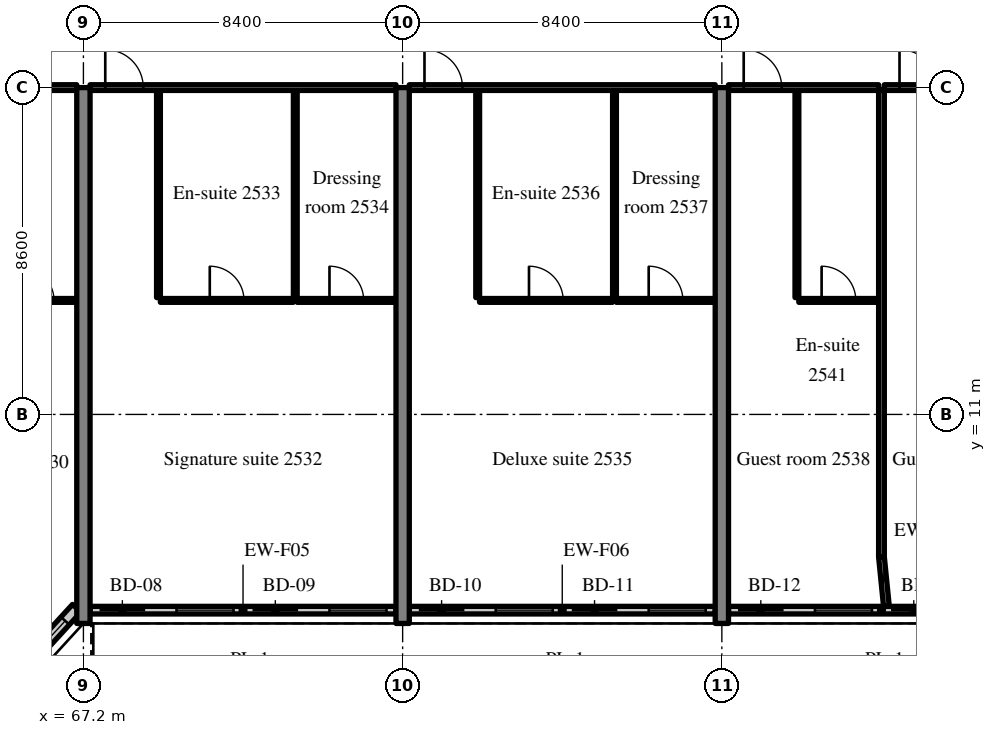
"""IFC4 building model, lengths in metres.
Left out: names, types, materials, properties, quantities, classifications, styles, units other than length and angle.
Written with IfcOpenShell. Run it as: python <this file> out.ifc"""

import sys

from ifc_helpers import new_model, si_unit, direction, frame, frame_2d, origin, place, context, subcontext, project, spatial, rectangle, extrude, source, transform, mapped, element, fill, save


model = new_model("IFC4")
c1 = context("Model", 3, precision=1e-05, world=origin(), true_north=direction((0.0, 1.0)))
c2 = subcontext(c1, "Body", "Model", "MODEL_VIEW")
j1 = project(units=[si_unit("LENGTHUNIT", "METRE"), si_unit("PLANEANGLEUNIT", "RADIAN")], contexts=[c1])
p1 = place(None, origin())
s1 = spatial("IfcSite", under=j1, at=p1, CompositionType="ELEMENT")
p2 = place(p1, origin())
s2 = spatial("IfcBuilding", under=s1, at=p2, CompositionType="ELEMENT")
p3 = place(p2, frame((0.0, 0.0, 106.6)))
s3 = spatial("IfcBuildingStorey", under=s2, at=p3, CompositionType="ELEMENT", Elevation=106.6)
m1 = source(origin(), c2, "Body", "SweptSolid", [
    extrude(rectangle(XDim=14.1, YDim=0.35, at=frame_2d((7.05, 0.0))), origin(), (0.0, 0.0, 1.0), 3.52),
])
for number, where, z_axis, x_axis in (
    (1, (67.2, 5.5, 0.0), (0.0, 0.0, 1.0), (0.0, 1.0, 0.0)),
    (2, (75.6, 5.5, 0.0), (0.0, 0.0, 1.0), (0.0, 1.0, 0.0)),
    (3, (84.0, 5.5, 0.0), (0.0, 0.0, 1.0), (0.0, 1.0, 0.0)),
):
    element("IfcWall", number, at=place(p3, frame(where, z_axis=z_axis, x_axis=x_axis)), inside=s3, PredefinedType="SHEAR", context=c2, shape_type="MappedRepresentation", body=[
        mapped(m1, transform((0.0, 0.0, 0.0), scale=1.0)),
    ])
m2 = source(origin(), c2, "Body", "SweptSolid", [
    extrude(rectangle(XDim=2.398, YDim=0.3, at=frame_2d((1.199, 0.0))), origin(), (0.0, 0.0, 1.0), 3.52),
])
p4 = place(p3, frame((65.404, 4.131, 0.0), z_axis=(0.0, 0.0, 1.0), x_axis=(0.675374189419, 0.737475222815, 0.0)))
e4 = element("IfcWall", 4, at=p4, inside=s3, PredefinedType="SOLIDWALL", context=c2, shape_type="MappedRepresentation", body=[
    mapped(m2, transform((0.0, 0.0, 0.0), scale=1.0)),
])
m3 = source(origin(), c2, "Body", "SweptSolid", [
    extrude(rectangle(XDim=1.5, YDim=2.0, at=frame_2d((0.75, 1.0))), frame((0.0, 0.16, 0.0), z_axis=(0.0, -1.0, 0.0), x_axis=(1.0, 0.0, 0.0)), (0.0, 0.0, 1.0), 0.32),
])
p5 = place(p4, frame((0.449, 0.0, 0.9)))
e5 = element("IfcOpeningElement", 5, at=p5, cuts=e4, PredefinedType="OPENING", context=c2, shape_type="MappedRepresentation", body=[
    mapped(m3, transform((0.0, 0.0, 0.0), scale=1.0)),
])
m4 = source(origin(), c2, "Body", "SweptSolid", [
    extrude(rectangle(XDim=8.05, YDim=0.2, at=frame_2d((4.025, 0.0))), origin(), (0.0, 0.0, 1.0), 2.82),
])
p6 = place(p3, frame((67.375, 5.85, 0.0), z_axis=(0.0, 0.0, 1.0), x_axis=(1.0, 0.0, 0.0)))
e6 = element("IfcWall", 6, at=p6, inside=s3, PredefinedType="SOLIDWALL", context=c2, shape_type="MappedRepresentation", body=[
    mapped(m4, transform((0.0, 0.0, 0.0), scale=1.0)),
])
m5 = source(origin(), c2, "Body", "SweptSolid", [
    extrude(rectangle(XDim=1.2, YDim=2.4, at=frame_2d((0.6, 1.2))), frame((0.0, 0.11, 0.0), z_axis=(0.0, -1.0, 0.0), x_axis=(1.0, 0.0, 0.0)), (0.0, 0.0, 1.0), 0.22),
])
p7 = place(p6, frame((0.25, 0.0, 0.0)))
e7 = element("IfcOpeningElement", 7, at=p7, cuts=e6, PredefinedType="OPENING", context=c2, shape_type="MappedRepresentation", body=[
    mapped(m5, transform((0.0, 0.0, 0.0), scale=1.0)),
])
m6 = source(origin(), c2, "Body", "SweptSolid", [
    extrude(rectangle(XDim=1.5, YDim=1.5, at=frame_2d((0.75, 0.75))), frame((0.0, 0.11, 0.0), z_axis=(0.0, -1.0, 0.0), x_axis=(1.0, 0.0, 0.0)), (0.0, 0.0, 1.0), 0.22),
])
p8 = place(p6, frame((2.275, 0.0, 0.9)))
e8 = element("IfcOpeningElement", 8, at=p8, cuts=e6, PredefinedType="OPENING", context=c2, shape_type="MappedRepresentation", body=[
    mapped(m6, transform((0.0, 0.0, 0.0), scale=1.0)),
])
p9 = place(p6, frame((4.275, 0.0, 0.0)))
e9 = element("IfcOpeningElement", 9, at=p9, cuts=e6, PredefinedType="OPENING", context=c2, shape_type="MappedRepresentation", body=[
    mapped(m5, transform((0.0, 0.0, 0.0), scale=1.0)),
])
p10 = place(p6, frame((6.3, 0.0, 0.9)))
e10 = element("IfcOpeningElement", 10, at=p10, cuts=e6, PredefinedType="OPENING", context=c2, shape_type="MappedRepresentation", body=[
    mapped(m6, transform((0.0, 0.0, 0.0), scale=1.0)),
])
p11 = place(p3, frame((75.775, 5.85, 0.0), z_axis=(0.0, 0.0, 1.0), x_axis=(1.0, 0.0, 0.0)))
e11 = element("IfcWall", 11, at=p11, inside=s3, PredefinedType="SOLIDWALL", context=c2, shape_type="MappedRepresentation", body=[
    mapped(m4, transform((0.0, 0.0, 0.0), scale=1.0)),
])
p12 = place(p11, frame((0.25, 0.0, 0.0)))
e12 = element("IfcOpeningElement", 12, at=p12, cuts=e11, PredefinedType="OPENING", context=c2, shape_type="MappedRepresentation", body=[
    mapped(m5, transform((0.0, 0.0, 0.0), scale=1.0)),
])
p13 = place(p11, frame((2.275, 0.0, 0.9)))
e13 = element("IfcOpeningElement", 13, at=p13, cuts=e11, PredefinedType="OPENING", context=c2, shape_type="MappedRepresentation", body=[
    mapped(m6, transform((0.0, 0.0, 0.0), scale=1.0)),
])
p14 = place(p11, frame((4.275, 0.0, 0.0)))
e14 = element("IfcOpeningElement", 14, at=p14, cuts=e11, PredefinedType="OPENING", context=c2, shape_type="MappedRepresentation", body=[
    mapped(m5, transform((0.0, 0.0, 0.0), scale=1.0)),
])
p15 = place(p11, frame((6.3, 0.0, 0.9)))
e15 = element("IfcOpeningElement", 15, at=p15, cuts=e11, PredefinedType="OPENING", context=c2, shape_type="MappedRepresentation", body=[
    mapped(m6, transform((0.0, 0.0, 0.0), scale=1.0)),
])
p16 = place(p3, frame((84.175, 5.85, 0.0), z_axis=(0.0, 0.0, 1.0), x_axis=(1.0, 0.0, 0.0)))
e16 = element("IfcWall", 16, at=p16, inside=s3, PredefinedType="SOLIDWALL", context=c2, shape_type="MappedRepresentation", body=[
    mapped(m4, transform((0.0, 0.0, 0.0), scale=1.0)),
])
p17 = place(p16, frame((0.25, 0.0, 0.0)))
e17 = element("IfcOpeningElement", 17, at=p17, cuts=e16, PredefinedType="OPENING", context=c2, shape_type="MappedRepresentation", body=[
    mapped(m5, transform((0.0, 0.0, 0.0), scale=1.0)),
])
p18 = place(p16, frame((2.275, 0.0, 0.9)))
e18 = element("IfcOpeningElement", 18, at=p18, cuts=e16, PredefinedType="OPENING", context=c2, shape_type="MappedRepresentation", body=[
    mapped(m6, transform((0.0, 0.0, 0.0), scale=1.0)),
])
p19 = place(p16, frame((4.275, 0.0, 0.0)))
e19 = element("IfcOpeningElement", 19, at=p19, cuts=e16, PredefinedType="OPENING", context=c2, shape_type="MappedRepresentation", body=[
    mapped(m5, transform((0.0, 0.0, 0.0), scale=1.0)),
])
p20 = place(p16, frame((6.3, 0.0, 0.9)))
e20 = element("IfcOpeningElement", 20, at=p20, cuts=e16, PredefinedType="OPENING", context=c2, shape_type="MappedRepresentation", body=[
    mapped(m6, transform((0.0, 0.0, 0.0), scale=1.0)),
])
m7 = source(origin(), c2, "Body", "SweptSolid", [
    extrude(rectangle(XDim=2.1, YDim=0.1, at=frame_2d((1.05, 0.0))), origin(), (0.0, 0.0, 1.0), 3.52),
])
p21 = place(p3, frame((64.925, 14.0, 0.0), z_axis=(0.0, 0.0, 1.0), x_axis=(1.0, 0.0, 0.0)))
e21 = element("IfcWall", 21, at=p21, inside=s3, PredefinedType="PARTITIONING", context=c2, shape_type="MappedRepresentation", body=[
    mapped(m7, transform((0.0, 0.0, 0.0), scale=1.0)),
])
m8 = source(origin(), c2, "Body", "SweptSolid", [
    extrude(rectangle(XDim=0.9, YDim=2.1, at=frame_2d((0.45, 1.05))), frame((0.0, 0.06, 0.0), z_axis=(0.0, -1.0, 0.0), x_axis=(1.0, 0.0, 0.0)), (0.0, 0.0, 1.0), 0.12),
])
p22 = place(p21, frame((0.6, 0.0, 0.0)))
e22 = element("IfcOpeningElement", 22, at=p22, cuts=e21, PredefinedType="OPENING", context=c2, shape_type="MappedRepresentation", body=[
    mapped(m8, transform((0.0, 0.0, 0.0), scale=1.0)),
])
m9 = source(origin(), c2, "Body", "SweptSolid", [
    extrude(rectangle(XDim=3.95, YDim=0.15, at=frame_2d((1.975, 0.0))), origin(), (0.0, 0.0, 1.0), 2.82),
])
p23 = place(p3, frame((63.075, 19.6, 0.0), z_axis=(0.0, 0.0, 1.0), x_axis=(1.0, 0.0, 0.0)))
e23 = element("IfcWall", 23, at=p23, inside=s3, PredefinedType="PARTITIONING", context=c2, shape_type="MappedRepresentation", body=[
    mapped(m9, transform((0.0, 0.0, 0.0), scale=1.0)),
])
m10 = source(origin(), c2, "Body", "SweptSolid", [
    extrude(rectangle(XDim=1.0, YDim=2.1, at=frame_2d((0.5, 1.05))), frame((0.0, 0.085, 0.0), z_axis=(0.0, -1.0, 0.0), x_axis=(1.0, 0.0, 0.0)), (0.0, 0.0, 1.0), 0.17),
])
p24 = place(p23, frame((0.4, 0.0, 0.0)))
e24 = element("IfcOpeningElement", 24, at=p24, cuts=e23, PredefinedType="OPENING", context=c2, shape_type="MappedRepresentation", body=[
    mapped(m10, transform((0.0, 0.0, 0.0), scale=1.0)),
])
m11 = source(origin(), c2, "Body", "SweptSolid", [
    extrude(rectangle(XDim=5.45, YDim=0.1, at=frame_2d((2.725, 0.0))), origin(), (0.0, 0.0, 1.0), 3.52),
])
for number, where, z_axis, x_axis in (
    (25, (69.175, 14.075, 0.0), (0.0, 0.0, 1.0), (0.0, 1.0, 0.0)),
    (26, (72.775, 14.075, 0.0), (0.0, 0.0, 1.0), (0.0, 1.0, 0.0)),
):
    element("IfcWall", number, at=place(p3, frame(where, z_axis=z_axis, x_axis=x_axis)), inside=s3, PredefinedType="PARTITIONING", context=c2, shape_type="MappedRepresentation", body=[
        mapped(m11, transform((0.0, 0.0, 0.0), scale=1.0)),
    ])
m12 = source(origin(), c2, "Body", "SweptSolid", [
    extrude(rectangle(XDim=3.5, YDim=0.1, at=frame_2d((1.75, 0.0))), origin(), (0.0, 0.0, 1.0), 3.52),
])
p25 = place(p3, frame((69.225, 14.0, 0.0), z_axis=(0.0, 0.0, 1.0), x_axis=(1.0, 0.0, 0.0)))
e27 = element("IfcWall", 27, at=p25, inside=s3, PredefinedType="PARTITIONING", context=c2, shape_type="MappedRepresentation", body=[
    mapped(m12, transform((0.0, 0.0, 0.0), scale=1.0)),
])
p26 = place(p25, frame((1.3, 0.0, 0.0)))
e28 = element("IfcOpeningElement", 28, at=p26, cuts=e27, PredefinedType="OPENING", context=c2, shape_type="MappedRepresentation", body=[
    mapped(m8, transform((0.0, 0.0, 0.0), scale=1.0)),
])
m13 = source(origin(), c2, "Body", "SweptSolid", [
    extrude(rectangle(XDim=2.6, YDim=0.1, at=frame_2d((1.3, 0.0))), origin(), (0.0, 0.0, 1.0), 3.52),
])
p27 = place(p3, frame((72.825, 14.0, 0.0), z_axis=(0.0, 0.0, 1.0), x_axis=(1.0, 0.0, 0.0)))
e29 = element("IfcWall", 29, at=p27, inside=s3, PredefinedType="PARTITIONING", context=c2, shape_type="MappedRepresentation", body=[
    mapped(m13, transform((0.0, 0.0, 0.0), scale=1.0)),
])
p28 = place(p27, frame((0.85, 0.0, 0.0)))
e30 = element("IfcOpeningElement", 30, at=p28, cuts=e29, PredefinedType="OPENING", context=c2, shape_type="MappedRepresentation", body=[
    mapped(m8, transform((0.0, 0.0, 0.0), scale=1.0)),
])
m14 = source(origin(), c2, "Body", "SweptSolid", [
    extrude(rectangle(XDim=8.05, YDim=0.15, at=frame_2d((4.025, 0.0))), origin(), (0.0, 0.0, 1.0), 2.82),
])
p29 = place(p3, frame((67.375, 19.6, 0.0), z_axis=(0.0, 0.0, 1.0), x_axis=(1.0, 0.0, 0.0)))
e31 = element("IfcWall", 31, at=p29, inside=s3, PredefinedType="PARTITIONING", context=c2, shape_type="MappedRepresentation", body=[
    mapped(m14, transform((0.0, 0.0, 0.0), scale=1.0)),
])
p30 = place(p29, frame((0.4, 0.0, 0.0)))
e32 = element("IfcOpeningElement", 32, at=p30, cuts=e31, PredefinedType="OPENING", context=c2, shape_type="MappedRepresentation", body=[
    mapped(m10, transform((0.0, 0.0, 0.0), scale=1.0)),
])
for number, where, z_axis, x_axis in (
    (33, (77.575, 14.075, 0.0), (0.0, 0.0, 1.0), (0.0, 1.0, 0.0)),
    (34, (81.175, 14.075, 0.0), (0.0, 0.0, 1.0), (0.0, 1.0, 0.0)),
):
    element("IfcWall", number, at=place(p3, frame(where, z_axis=z_axis, x_axis=x_axis)), inside=s3, PredefinedType="PARTITIONING", context=c2, shape_type="MappedRepresentation", body=[
        mapped(m11, transform((0.0, 0.0, 0.0), scale=1.0)),
    ])
p31 = place(p3, frame((77.625, 14.0, 0.0), z_axis=(0.0, 0.0, 1.0), x_axis=(1.0, 0.0, 0.0)))
e35 = element("IfcWall", 35, at=p31, inside=s3, PredefinedType="PARTITIONING", context=c2, shape_type="MappedRepresentation", body=[
    mapped(m12, transform((0.0, 0.0, 0.0), scale=1.0)),
])
p32 = place(p31, frame((1.3, 0.0, 0.0)))
e36 = element("IfcOpeningElement", 36, at=p32, cuts=e35, PredefinedType="OPENING", context=c2, shape_type="MappedRepresentation", body=[
    mapped(m8, transform((0.0, 0.0, 0.0), scale=1.0)),
])
m15 = source(origin(), c2, "Body", "SweptSolid", [
    extrude(rectangle(XDim=2.6, YDim=0.1, at=frame_2d((1.3, 0.0))), origin(), (0.0, 0.0, 1.0), 3.52),
])
p33 = place(p3, frame((81.225, 14.0, 0.0), z_axis=(0.0, 0.0, 1.0), x_axis=(1.0, 0.0, 0.0)))
e37 = element("IfcWall", 37, at=p33, inside=s3, PredefinedType="PARTITIONING", context=c2, shape_type="MappedRepresentation", body=[
    mapped(m15, transform((0.0, 0.0, 0.0), scale=1.0)),
])
p34 = place(p33, frame((0.85, 0.0, 0.0)))
e38 = element("IfcOpeningElement", 38, at=p34, cuts=e37, PredefinedType="OPENING", context=c2, shape_type="MappedRepresentation", body=[
    mapped(m8, transform((0.0, 0.0, 0.0), scale=1.0)),
])
p35 = place(p3, frame((75.775, 19.6, 0.0), z_axis=(0.0, 0.0, 1.0), x_axis=(1.0, 0.0, 0.0)))
e39 = element("IfcWall", 39, at=p35, inside=s3, PredefinedType="PARTITIONING", context=c2, shape_type="MappedRepresentation", body=[
    mapped(m14, transform((0.0, 0.0, 0.0), scale=1.0)),
])
p36 = place(p35, frame((0.4, 0.0, 0.0)))
e40 = element("IfcOpeningElement", 40, at=p36, cuts=e39, PredefinedType="OPENING", context=c2, shape_type="MappedRepresentation", body=[
    mapped(m10, transform((0.0, 0.0, 0.0), scale=1.0)),
])
p37 = place(p3, frame((85.975, 14.075, 0.0), z_axis=(0.0, 0.0, 1.0), x_axis=(0.0, 1.0, 0.0)))
e41 = element("IfcWall", 41, at=p37, inside=s3, PredefinedType="PARTITIONING", context=c2, shape_type="MappedRepresentation", body=[
    mapped(m11, transform((0.0, 0.0, 0.0), scale=1.0)),
])
m16 = source(origin(), c2, "Body", "SweptSolid", [
    extrude(rectangle(XDim=2.1, YDim=0.1, at=frame_2d((1.05, 0.0))), origin(), (0.0, 0.0, 1.0), 3.52),
])
p38 = place(p3, frame((86.025, 14.0, 0.0), z_axis=(0.0, 0.0, 1.0), x_axis=(1.0, 0.0, 0.0)))
e42 = element("IfcWall", 42, at=p38, inside=s3, PredefinedType="PARTITIONING", context=c2, shape_type="MappedRepresentation", body=[
    mapped(m16, transform((0.0, 0.0, 0.0), scale=1.0)),
])
p39 = place(p38, frame((0.6, 0.0, 0.0)))
e43 = element("IfcOpeningElement", 43, at=p39, cuts=e42, PredefinedType="OPENING", context=c2, shape_type="MappedRepresentation", body=[
    mapped(m8, transform((0.0, 0.0, 0.0), scale=1.0)),
])
p40 = place(p3, frame((84.175, 19.6, 0.0), z_axis=(0.0, 0.0, 1.0), x_axis=(1.0, 0.0, 0.0)))
e44 = element("IfcWall", 44, at=p40, inside=s3, PredefinedType="PARTITIONING", context=c2, shape_type="MappedRepresentation", body=[
    mapped(m9, transform((0.0, 0.0, 0.0), scale=1.0)),
])
p41 = place(p40, frame((0.4, 0.0, 0.0)))
e45 = element("IfcOpeningElement", 45, at=p41, cuts=e44, PredefinedType="OPENING", context=c2, shape_type="MappedRepresentation", body=[
    mapped(m10, transform((0.0, 0.0, 0.0), scale=1.0)),
])
m17 = source(origin(), c2, "Body", "SweptSolid", [
    extrude(rectangle(XDim=3.95, YDim=0.15, at=frame_2d((1.975, 0.0))), origin(), (0.0, 0.0, 1.0), 2.82),
])
p42 = place(p3, frame((88.275, 19.6, 0.0), z_axis=(0.0, 0.0, 1.0), x_axis=(1.0, 0.0, 0.0)))
e46 = element("IfcWall", 46, at=p42, inside=s3, PredefinedType="PARTITIONING", context=c2, shape_type="MappedRepresentation", body=[
    mapped(m17, transform((0.0, 0.0, 0.0), scale=1.0)),
])
p43 = place(p42, frame((0.4, 0.0, 0.0)))
e47 = element("IfcOpeningElement", 47, at=p43, cuts=e46, PredefinedType="OPENING", context=c2, shape_type="MappedRepresentation", body=[
    mapped(m10, transform((0.0, 0.0, 0.0), scale=1.0)),
])
m18 = source(origin(), c2, "Body", "SweptSolid", [
    extrude(rectangle(XDim=12.275, YDim=0.15, at=frame_2d((6.137, 0.0))), origin(), (0.0, 0.0, 1.0), 3.52),
])
p44 = place(p3, frame((88.2, 7.25, 0.0), z_axis=(0.0, 0.0, 1.0), x_axis=(0.0, 1.0, 0.0)))
e48 = element("IfcWall", 48, at=p44, inside=s3, PredefinedType="PARTITIONING", context=c2, shape_type="MappedRepresentation", body=[
    mapped(m18, transform((0.0, 0.0, 0.0), scale=1.0)),
])
m19 = source(origin(), c2, "Body", "SweptSolid", [
    extrude(rectangle(XDim=1.307, YDim=0.15, at=frame_2d((0.653, 0.0))), origin(), (0.0, 0.0, 1.0), 3.52),
])
p45 = place(p3, frame((88.33, 5.95, 0.0), z_axis=(0.0, 0.0, 1.0), x_axis=(-0.099596223396, 0.99502793543, 0.0)))
e49 = element("IfcWall", 49, at=p45, inside=s3, PredefinedType="PARTITIONING", context=c2, shape_type="MappedRepresentation", body=[
    mapped(m19, transform((0.0, 0.0, 0.0), scale=1.0)),
])
m20 = source(origin(), c2, "Body", "SweptSolid", [
    extrude(rectangle(XDim=1.5, YDim=2.0, at=frame_2d((0.75, 1.0))), frame((0.0, 0.03, 0.0), z_axis=(0.0, -1.0, 0.0), x_axis=(1.0, 0.0, 0.0)), (0.0, 0.0, 1.0), 0.06),
])
p46 = place(p5, origin())
e50 = element("IfcWindow", 50, at=p46, inside=s3, PartitioningType="SINGLE_PANEL", PredefinedType="WINDOW", context=c2, shape_type="MappedRepresentation", body=[
    mapped(m20, transform((0.0, 0.0, 0.0), scale=1.0)),
])
fill(e5, e50)
m21 = source(origin(), c2, "Body", "SweptSolid", [
    extrude(rectangle(XDim=1.2, YDim=2.4, at=frame_2d((0.6, 1.2))), frame((0.0, 0.025, 0.0), z_axis=(0.0, -1.0, 0.0), x_axis=(1.0, 0.0, 0.0)), (0.0, 0.0, 1.0), 0.05),
])
p47 = place(p7, origin())
e51 = element("IfcDoor", 51, at=p47, inside=s3, OperationType="SLIDING_TO_RIGHT", PredefinedType="DOOR", context=c2, shape_type="MappedRepresentation", body=[
    mapped(m21, transform((0.0, 0.0, 0.0), scale=1.0)),
])
fill(e7, e51)
m22 = source(origin(), c2, "Body", "SweptSolid", [
    extrude(rectangle(XDim=1.5, YDim=1.5, at=frame_2d((0.75, 0.75))), frame((0.0, 0.03, 0.0), z_axis=(0.0, -1.0, 0.0), x_axis=(1.0, 0.0, 0.0)), (0.0, 0.0, 1.0), 0.06),
])
p48 = place(p8, origin())
e52 = element("IfcWindow", 52, at=p48, inside=s3, PartitioningType="SINGLE_PANEL", PredefinedType="WINDOW", context=c2, shape_type="MappedRepresentation", body=[
    mapped(m22, transform((0.0, 0.0, 0.0), scale=1.0)),
])
fill(e8, e52)
p49 = place(p9, origin())
e53 = element("IfcDoor", 53, at=p49, inside=s3, OperationType="SLIDING_TO_LEFT", PredefinedType="DOOR", context=c2, shape_type="MappedRepresentation", body=[
    mapped(m21, transform((0.0, 0.0, 0.0), scale=1.0)),
])
fill(e9, e53)
p50 = place(p10, origin())
e54 = element("IfcWindow", 54, at=p50, inside=s3, PartitioningType="SINGLE_PANEL", PredefinedType="WINDOW", context=c2, shape_type="MappedRepresentation", body=[
    mapped(m22, transform((0.0, 0.0, 0.0), scale=1.0)),
])
fill(e10, e54)
p51 = place(p12, origin())
e55 = element("IfcDoor", 55, at=p51, inside=s3, OperationType="SLIDING_TO_RIGHT", PredefinedType="DOOR", context=c2, shape_type="MappedRepresentation", body=[
    mapped(m21, transform((0.0, 0.0, 0.0), scale=1.0)),
])
fill(e12, e55)
p52 = place(p13, origin())
e56 = element("IfcWindow", 56, at=p52, inside=s3, PartitioningType="SINGLE_PANEL", PredefinedType="WINDOW", context=c2, shape_type="MappedRepresentation", body=[
    mapped(m22, transform((0.0, 0.0, 0.0), scale=1.0)),
])
fill(e13, e56)
p53 = place(p14, origin())
e57 = element("IfcDoor", 57, at=p53, inside=s3, OperationType="SLIDING_TO_LEFT", PredefinedType="DOOR", context=c2, shape_type="MappedRepresentation", body=[
    mapped(m21, transform((0.0, 0.0, 0.0), scale=1.0)),
])
fill(e14, e57)
p54 = place(p15, origin())
e58 = element("IfcWindow", 58, at=p54, inside=s3, PartitioningType="SINGLE_PANEL", PredefinedType="WINDOW", context=c2, shape_type="MappedRepresentation", body=[
    mapped(m22, transform((0.0, 0.0, 0.0), scale=1.0)),
])
fill(e15, e58)
p55 = place(p17, origin())
e59 = element("IfcDoor", 59, at=p55, inside=s3, OperationType="SLIDING_TO_RIGHT", PredefinedType="DOOR", context=c2, shape_type="MappedRepresentation", body=[
    mapped(m21, transform((0.0, 0.0, 0.0), scale=1.0)),
])
fill(e17, e59)
p56 = place(p18, origin())
e60 = element("IfcWindow", 60, at=p56, inside=s3, PartitioningType="SINGLE_PANEL", PredefinedType="WINDOW", context=c2, shape_type="MappedRepresentation", body=[
    mapped(m22, transform((0.0, 0.0, 0.0), scale=1.0)),
])
fill(e18, e60)
p57 = place(p19, origin())
e61 = element("IfcDoor", 61, at=p57, inside=s3, OperationType="SLIDING_TO_LEFT", PredefinedType="DOOR", context=c2, shape_type="MappedRepresentation", body=[
    mapped(m21, transform((0.0, 0.0, 0.0), scale=1.0)),
])
fill(e19, e61)
m23 = source(origin(), c2, "Body", "SweptSolid", [
    extrude(rectangle(XDim=0.9, YDim=2.1, at=frame_2d((0.45, 1.05))), frame((0.0, 0.025, 0.0), z_axis=(0.0, -1.0, 0.0), x_axis=(1.0, 0.0, 0.0)), (0.0, 0.0, 1.0), 0.05),
])
p58 = place(p22, origin())
e62 = element("IfcDoor", 62, at=p58, inside=s3, OperationType="SINGLE_SWING_LEFT", PredefinedType="DOOR", context=c2, shape_type="MappedRepresentation", body=[
    mapped(m23, transform((0.0, 0.0, 0.0), scale=1.0)),
])
fill(e22, e62)
p59 = place(p26, origin())
e63 = element("IfcDoor", 63, at=p59, inside=s3, OperationType="SINGLE_SWING_LEFT", PredefinedType="DOOR", context=c2, shape_type="MappedRepresentation", body=[
    mapped(m23, transform((0.0, 0.0, 0.0), scale=1.0)),
])
fill(e28, e63)
p60 = place(p28, origin())
e64 = element("IfcDoor", 64, at=p60, inside=s3, OperationType="SINGLE_SWING_LEFT", PredefinedType="DOOR", context=c2, shape_type="MappedRepresentation", body=[
    mapped(m23, transform((0.0, 0.0, 0.0), scale=1.0)),
])
fill(e30, e64)
m24 = source(origin(), c2, "Body", "SweptSolid", [
    extrude(rectangle(XDim=1.0, YDim=2.1, at=frame_2d((0.5, 1.05))), frame((0.0, 0.025, 0.0), z_axis=(0.0, -1.0, 0.0), x_axis=(1.0, 0.0, 0.0)), (0.0, 0.0, 1.0), 0.05),
])
p61 = place(p30, origin())
e65 = element("IfcDoor", 65, at=p61, inside=s3, OperationType="SINGLE_SWING_LEFT", PredefinedType="DOOR", context=c2, shape_type="MappedRepresentation", body=[
    mapped(m24, transform((0.0, 0.0, 0.0), scale=1.0)),
])
fill(e32, e65)
p62 = place(p32, origin())
e66 = element("IfcDoor", 66, at=p62, inside=s3, OperationType="SINGLE_SWING_LEFT", PredefinedType="DOOR", context=c2, shape_type="MappedRepresentation", body=[
    mapped(m23, transform((0.0, 0.0, 0.0), scale=1.0)),
])
fill(e36, e66)
p63 = place(p34, origin())
e67 = element("IfcDoor", 67, at=p63, inside=s3, OperationType="SINGLE_SWING_LEFT", PredefinedType="DOOR", context=c2, shape_type="MappedRepresentation", body=[
    mapped(m23, transform((0.0, 0.0, 0.0), scale=1.0)),
])
fill(e38, e67)
p64 = place(p36, origin())
e68 = element("IfcDoor", 68, at=p64, inside=s3, OperationType="SINGLE_SWING_LEFT", PredefinedType="DOOR", context=c2, shape_type="MappedRepresentation", body=[
    mapped(m24, transform((0.0, 0.0, 0.0), scale=1.0)),
])
fill(e40, e68)
p65 = place(p39, origin())
e69 = element("IfcDoor", 69, at=p65, inside=s3, OperationType="SINGLE_SWING_LEFT", PredefinedType="DOOR", context=c2, shape_type="MappedRepresentation", body=[
    mapped(m23, transform((0.0, 0.0, 0.0), scale=1.0)),
])
fill(e43, e69)
p66 = place(p41, origin())
e70 = element("IfcDoor", 70, at=p66, inside=s3, OperationType="SINGLE_SWING_LEFT", PredefinedType="DOOR", context=c2, shape_type="MappedRepresentation", body=[
    mapped(m24, transform((0.0, 0.0, 0.0), scale=1.0)),
])
fill(e45, e70)
p67 = place(p43, origin())
e71 = element("IfcDoor", 71, at=p67, inside=s3, OperationType="SINGLE_SWING_LEFT", PredefinedType="DOOR", context=c2, shape_type="MappedRepresentation", body=[
    mapped(m24, transform((0.0, 0.0, 0.0), scale=1.0)),
])
fill(e47, e71)
save(model, sys.argv[1])
